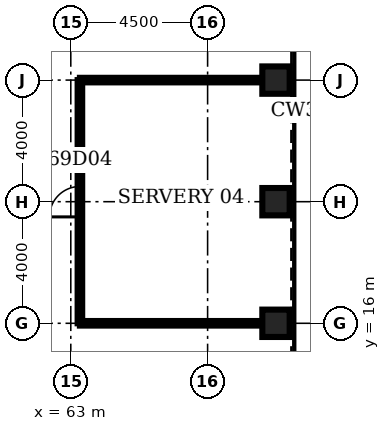
"""IFC4 building model, lengths in metres.
Left out: names, types, materials, properties, quantities, classifications, styles, units other than length and angle.
Written with IfcOpenShell. Run it as: python <this file> out.ifc"""

import sys

from ifc_helpers import new_model, si_unit, direction, frame, frame_2d, origin, origin_2d, place, context, subcontext, project, spatial, rectangle, hollow_rectangle, extrude, element, fill, save


model = new_model("IFC4")
c1 = context("Model", 3, precision=1e-05, world=origin(), true_north=direction((0.0, 1.0)))
c2 = subcontext(c1, "Body", "Model", "MODEL_VIEW")
j1 = project(units=[si_unit("LENGTHUNIT", "METRE"), si_unit("PLANEANGLEUNIT", "RADIAN")], contexts=[c1])
p1 = place(None, origin())
s1 = spatial("IfcSite", under=j1, at=p1, CompositionType="ELEMENT")
p2 = place(p1, origin())
s2 = spatial("IfcBuilding", under=s1, at=p2, CompositionType="ELEMENT")
p3 = place(p2, frame((0.0, 0.0, 304.7)))
s3 = spatial("IfcBuildingStorey", under=s2, at=p3, CompositionType="ELEMENT", Elevation=304.7)
for number, where, z_axis, x_axis in (
    (1, (69.75, 16.0, 0.0), (0.0, 0.0, 1.0), (1.0, 0.0, 0.0)),
    (2, (69.75, 20.0, 0.0), (0.0, 0.0, 1.0), (1.0, 0.0, 0.0)),
    (3, (69.75, 24.0, 0.0), (0.0, 0.0, 1.0), (1.0, 0.0, 0.0)),
):
    element("IfcColumn", number, at=place(p3, frame(where, z_axis=z_axis, x_axis=x_axis)), inside=s3, PredefinedType="COLUMN", context=c2, shape_type="SweptSolid", body=[
        extrude(hollow_rectangle(XDim=0.9, YDim=0.9, WallThickness=0.06, at=origin_2d()), origin(), (0.0, 0.0, 1.0), 4.2),
    ])
for number, where, z_axis, x_axis in (
    (4, (63.3, 16.0, 0.0), (0.0, 0.0, 1.0), (1.0, 0.0, 0.0)),
    (5, (63.3, 24.0, 0.0), (0.0, 0.0, 1.0), (1.0, 0.0, 0.0)),
):
    element("IfcWall", number, at=place(p3, frame(where, z_axis=z_axis, x_axis=x_axis)), inside=s3, PredefinedType="PARTITIONING", context=c2, shape_type="SweptSolid", body=[
        extrude(rectangle(XDim=6.0, YDim=0.15, at=frame_2d((3.0, 0.0))), origin(), (0.0, 0.0, 1.0), 3.0),
    ])
p4 = place(p3, frame((63.3, 16.0, 0.0), z_axis=(0.0, 0.0, 1.0), x_axis=(0.0, 1.0, 0.0)))
e6 = element("IfcWall", 6, at=p4, inside=s3, PredefinedType="PARTITIONING", context=c2, shape_type="SweptSolid", body=[
    extrude(rectangle(XDim=8.0, YDim=0.15, at=frame_2d((4.0, 0.0))), origin(), (0.0, 0.0, 1.0), 3.0),
])
p5 = place(p4, frame((3.5, 0.0, 0.0)))
e7 = element("IfcOpeningElement", 7, at=p5, cuts=e6, PredefinedType="OPENING", context=c2, shape_type="SweptSolid", body=[
    extrude(rectangle(XDim=1.0, YDim=2.1, at=frame_2d((0.5, 1.05))), frame((0.0, 0.085, 0.0), z_axis=(0.0, -1.0, 0.0), x_axis=(1.0, 0.0, 0.0)), (0.0, 0.0, 1.0), 0.17),
])
p6 = place(p5, origin())
e8 = element("IfcDoor", 8, at=p6, inside=s3, OperationType="SINGLE_SWING_LEFT", PredefinedType="DOOR", context=c2, shape_type="SweptSolid", body=[
    extrude(rectangle(XDim=1.0, YDim=2.1, at=frame_2d((0.5, 1.05))), frame((0.0, 0.025, 0.0), z_axis=(0.0, -1.0, 0.0), x_axis=(1.0, 0.0, 0.0)), (0.0, 0.0, 1.0), 0.05),
])
fill(e7, e8)
save(model, sys.argv[1])
